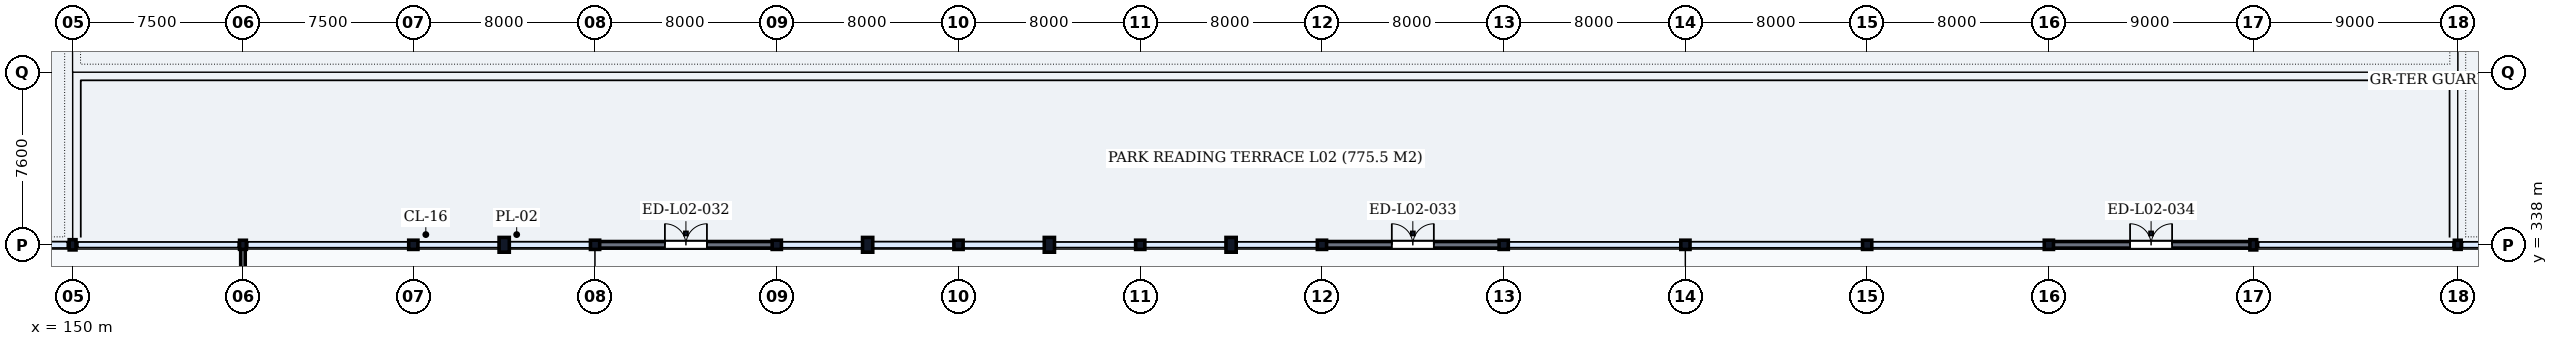
"""IFC4 building model, lengths in metres.
Left out: names, types, materials, properties, quantities, classifications, styles, units other than length and angle.
Written with IfcOpenShell. Run it as: python <this file> out.ifc"""

import sys

from ifc_helpers import new_model, si_unit, direction, frame, frame_2d, origin, origin_2d, place, context, subcontext, project, spatial, rectangle, hollow_circle, i_section, extrude, element, fill, save


model = new_model("IFC4")
c1 = context("Model", 3, precision=1e-05, world=origin(), true_north=direction((0.0, 1.0)))
c2 = subcontext(c1, "Body", "Model", "MODEL_VIEW")
j1 = project(units=[si_unit("LENGTHUNIT", "METRE"), si_unit("PLANEANGLEUNIT", "RADIAN")], contexts=[c1])
p1 = place(None, origin())
s1 = spatial("IfcSite", under=j1, at=p1, CompositionType="ELEMENT")
p2 = place(p1, origin())
s2 = spatial("IfcBuilding", under=s1, at=p2, CompositionType="ELEMENT")
p3 = place(p2, frame((0.0, 0.0, 5.4)))
s3 = spatial("IfcBuildingStorey", under=s2, at=p3, CompositionType="ELEMENT", Elevation=5.4)
p4 = place(p3, frame((150.0, 338.0, 0.0), z_axis=(0.0, 0.0, 1.0), x_axis=(1.0, 0.0, 0.0)))
e1 = element("IfcColumn", 1, at=p4, inside=s3, PredefinedType="COLUMN", context=c2, shape_type="SweptSolid", body=[
    extrude(i_section(OverallWidth=0.3, OverallDepth=0.45, WebThickness=0.014, FlangeThickness=0.026, FilletRadius=0.027, at=origin_2d()), origin(), (0.0, 0.0, 1.0), 5.1),
])
p5 = place(p3, frame((157.5, 338.0, 0.0), z_axis=(0.0, 0.0, 1.0), x_axis=(1.0, 0.0, 0.0)))
e2 = element("IfcColumn", 2, at=p5, inside=s3, PredefinedType="COLUMN", context=c2, shape_type="SweptSolid", body=[
    extrude(i_section(OverallWidth=0.3, OverallDepth=0.4, WebThickness=0.013, FlangeThickness=0.024, FilletRadius=0.027, at=origin_2d()), origin(), (0.0, 0.0, 1.0), 5.1),
])
for number, where, z_axis, x_axis in (
    (3, (165.0, 338.0, 0.0), (0.0, 0.0, 1.0), (1.0, 0.0, 0.0)),
    (4, (173.0, 338.0, 0.0), (0.0, 0.0, 1.0), (1.0, 0.0, 0.0)),
    (5, (181.0, 338.0, 0.0), (0.0, 0.0, 1.0), (1.0, 0.0, 0.0)),
    (6, (189.0, 338.0, 0.0), (0.0, 0.0, 1.0), (1.0, 0.0, 0.0)),
    (7, (197.0, 338.0, 0.0), (0.0, 0.0, 1.0), (1.0, 0.0, 0.0)),
    (8, (205.0, 338.0, 0.0), (0.0, 0.0, 1.0), (1.0, 0.0, 0.0)),
    (9, (213.0, 338.0, 0.0), (0.0, 0.0, 1.0), (1.0, 0.0, 0.0)),
    (10, (221.0, 338.0, 0.0), (0.0, 0.0, 1.0), (1.0, 0.0, 0.0)),
    (11, (229.0, 338.0, 0.0), (0.0, 0.0, 1.0), (1.0, 0.0, 0.0)),
    (12, (237.0, 338.0, 0.0), (0.0, 0.0, 1.0), (1.0, 0.0, 0.0)),
):
    element("IfcColumn", number, at=place(p3, frame(where, z_axis=z_axis, x_axis=x_axis)), inside=s3, PredefinedType="COLUMN", context=c2, shape_type="SweptSolid", body=[
        extrude(hollow_circle(Radius=0.203, WallThickness=0.016, at=origin_2d()), origin(), (0.0, 0.0, 1.0), 5.1),
    ])
p6 = place(p3, frame((246.0, 338.0, 0.0), z_axis=(0.0, 0.0, 1.0), x_axis=(1.0, 0.0, 0.0)))
e13 = element("IfcColumn", 13, at=p6, inside=s3, PredefinedType="COLUMN", context=c2, shape_type="SweptSolid", body=[
    extrude(i_section(OverallWidth=0.3, OverallDepth=0.45, WebThickness=0.014, FlangeThickness=0.026, FilletRadius=0.027, at=origin_2d()), origin(), (0.0, 0.0, 1.0), 5.1),
])
p7 = place(p3, frame((255.0, 338.0, 0.0), z_axis=(0.0, 0.0, 1.0), x_axis=(1.0, 0.0, 0.0)))
e14 = element("IfcColumn", 14, at=p7, inside=s3, PredefinedType="COLUMN", context=c2, shape_type="SweptSolid", body=[
    extrude(i_section(OverallWidth=0.3, OverallDepth=0.4, WebThickness=0.013, FlangeThickness=0.024, FilletRadius=0.027, at=origin_2d()), origin(), (0.0, 0.0, 1.0), 5.1),
])
for number, where, z_axis, x_axis in (
    (15, (169.0, 338.0, 0.0), (0.0, 0.0, 1.0), (1.0, 0.0, 0.0)),
    (16, (185.0, 338.0, 0.0), (0.0, 0.0, 1.0), (1.0, 0.0, 0.0)),
    (17, (193.0, 338.0, 0.0), (0.0, 0.0, 1.0), (1.0, 0.0, 0.0)),
    (18, (201.0, 338.0, 0.0), (0.0, 0.0, 1.0), (1.0, 0.0, 0.0)),
):
    element("IfcColumn", number, at=place(p3, frame(where, z_axis=z_axis, x_axis=x_axis)), inside=s3, PredefinedType="PILASTER", context=c2, shape_type="SweptSolid", body=[
        extrude(rectangle(XDim=0.45, YDim=0.65, at=origin_2d()), origin(), (0.0, 0.0, 1.0), 5.1),
    ])
p8 = place(p3, frame((173.006, 338.0, 0.0), z_axis=(0.0, 0.0, 1.0), x_axis=(1.0, 0.0, 0.0)))
e19 = element("IfcWall", 19, at=p8, inside=s3, PredefinedType="SOLIDWALL", context=c2, shape_type="SweptSolid", body=[
    extrude(rectangle(XDim=7.988, YDim=0.29, at=frame_2d((3.994, 0.0))), origin(), (0.0, 0.0, 1.0), 4.538),
])
p9 = place(p8, frame((3.069, 0.0, 0.0)))
e20 = element("IfcOpeningElement", 20, at=p9, cuts=e19, PredefinedType="OPENING", context=c2, shape_type="SweptSolid", body=[
    extrude(rectangle(XDim=1.85, YDim=2.35, at=frame_2d((0.925, 1.175))), frame((0.0, 0.16, 0.0), z_axis=(0.0, -1.0, 0.0), x_axis=(1.0, 0.0, 0.0)), (0.0, 0.0, 1.0), 0.32),
])
p10 = place(p3, frame((205.006, 338.0, 0.0), z_axis=(0.0, 0.0, 1.0), x_axis=(1.0, 0.0, 0.0)))
e21 = element("IfcWall", 21, at=p10, inside=s3, PredefinedType="SOLIDWALL", context=c2, shape_type="SweptSolid", body=[
    extrude(rectangle(XDim=7.988, YDim=0.29, at=frame_2d((3.994, 0.0))), origin(), (0.0, 0.0, 1.0), 4.538),
])
p11 = place(p10, frame((3.069, 0.0, 0.0)))
e22 = element("IfcOpeningElement", 22, at=p11, cuts=e21, PredefinedType="OPENING", context=c2, shape_type="SweptSolid", body=[
    extrude(rectangle(XDim=1.85, YDim=2.35, at=frame_2d((0.925, 1.175))), frame((0.0, 0.16, 0.0), z_axis=(0.0, -1.0, 0.0), x_axis=(1.0, 0.0, 0.0)), (0.0, 0.0, 1.0), 0.32),
])
p12 = place(p3, frame((237.006, 338.0, 0.0), z_axis=(0.0, 0.0, 1.0), x_axis=(1.0, 0.0, 0.0)))
e23 = element("IfcWall", 23, at=p12, inside=s3, PredefinedType="SOLIDWALL", context=c2, shape_type="SweptSolid", body=[
    extrude(rectangle(XDim=8.988, YDim=0.29, at=frame_2d((4.494, 0.0))), origin(), (0.0, 0.0, 1.0), 4.498),
])
p13 = place(p12, frame((3.569, 0.0, 0.0)))
e24 = element("IfcOpeningElement", 24, at=p13, cuts=e23, PredefinedType="OPENING", context=c2, shape_type="SweptSolid", body=[
    extrude(rectangle(XDim=1.85, YDim=2.35, at=frame_2d((0.925, 1.175))), frame((0.0, 0.16, 0.0), z_axis=(0.0, -1.0, 0.0), x_axis=(1.0, 0.0, 0.0)), (0.0, 0.0, 1.0), 0.32),
])
p14 = place(p3, frame((135.1, 337.9, 5.1), z_axis=(0.0, 0.0, 1.0), x_axis=(1.0, 0.0, 0.0)))
e25 = element("IfcWall", 25, at=p14, inside=s3, PredefinedType="PARAPET", context=c2, shape_type="SweptSolid", body=[
    extrude(rectangle(XDim=14.8, YDim=0.18, at=frame_2d((7.4, 0.0))), origin(), (0.0, 0.0, 1.0), 1.2),
])
p15 = place(p3, frame((150.1, 337.9, 5.1), z_axis=(0.0, 0.0, 1.0), x_axis=(1.0, 0.0, 0.0)))
e26 = element("IfcWall", 26, at=p15, inside=s3, PredefinedType="PARAPET", context=c2, shape_type="SweptSolid", body=[
    extrude(rectangle(XDim=7.3, YDim=0.18, at=frame_2d((3.65, 0.0))), origin(), (0.0, 0.0, 1.0), 1.2),
])
p16 = place(p3, frame((255.1, 337.9, 5.1), z_axis=(0.0, 0.0, 1.0), x_axis=(1.0, 0.0, 0.0)))
e27 = element("IfcWall", 27, at=p16, inside=s3, PredefinedType="PARAPET", context=c2, shape_type="SweptSolid", body=[
    extrude(rectangle(XDim=17.8, YDim=0.18, at=frame_2d((8.9, 0.0))), origin(), (0.0, 0.0, 1.0), 1.2),
])
p17 = place(p3, frame((157.6, 337.9, 5.1), z_axis=(0.0, 0.0, 1.0), x_axis=(1.0, 0.0, 0.0)))
e28 = element("IfcWall", 28, at=p17, inside=s3, PredefinedType="PARAPET", context=c2, shape_type="SweptSolid", body=[
    extrude(rectangle(XDim=97.3, YDim=0.18, at=frame_2d((48.65, 0.0))), origin(), (0.0, 0.0, 1.0), 1.2),
])
p18 = place(p3, frame((157.5, 308.4, 0.0), z_axis=(0.0, 0.0, 1.0), x_axis=(0.0, 1.0, 0.0)))
e29 = element("IfcWall", 29, at=p18, inside=s3, PredefinedType="PARTITIONING", context=c2, shape_type="SweptSolid", body=[
    extrude(rectangle(XDim=29.6, YDim=0.2, at=frame_2d((14.8, 0.0))), origin(), (0.0, 0.0, 1.0), 4.498),
])
p19 = place(p18, frame((3.45, 0.0, 0.0)))
e30 = element("IfcOpeningElement", 30, at=p19, cuts=e29, PredefinedType="OPENING", context=c2, shape_type="SweptSolid", body=[
    extrude(rectangle(XDim=1.1, YDim=2.1, at=frame_2d((0.55, 1.05))), frame((0.0, 0.115, 0.0), z_axis=(0.0, -1.0, 0.0), x_axis=(1.0, 0.0, 0.0)), (0.0, 0.0, 1.0), 0.23),
])
p20 = place(p18, frame((17.25, 0.0, 0.0)))
e31 = element("IfcOpeningElement", 31, at=p20, cuts=e29, PredefinedType="OPENING", context=c2, shape_type="SweptSolid", body=[
    extrude(rectangle(XDim=1.5, YDim=2.25, at=frame_2d((0.75, 1.125))), frame((0.0, 0.115, 0.0), z_axis=(0.0, -1.0, 0.0), x_axis=(1.0, 0.0, 0.0)), (0.0, 0.0, 1.0), 0.23),
])
p21 = place(p9, origin())
e32 = element("IfcDoor", 32, at=p21, inside=s3, OperationType="DOUBLE_DOOR_SINGLE_SWING", PredefinedType="DOOR", context=c2, shape_type="SweptSolid", body=[
    extrude(rectangle(XDim=1.85, YDim=2.35, at=frame_2d((0.925, 1.175))), frame((0.0, 0.025, 0.0), z_axis=(0.0, -1.0, 0.0), x_axis=(1.0, 0.0, 0.0)), (0.0, 0.0, 1.0), 0.05),
])
fill(e20, e32)
p22 = place(p11, origin())
e33 = element("IfcDoor", 33, at=p22, inside=s3, OperationType="DOUBLE_DOOR_SINGLE_SWING", PredefinedType="DOOR", context=c2, shape_type="SweptSolid", body=[
    extrude(rectangle(XDim=1.85, YDim=2.35, at=frame_2d((0.925, 1.175))), frame((0.0, 0.025, 0.0), z_axis=(0.0, -1.0, 0.0), x_axis=(1.0, 0.0, 0.0)), (0.0, 0.0, 1.0), 0.05),
])
fill(e22, e33)
p23 = place(p13, origin())
e34 = element("IfcDoor", 34, at=p23, inside=s3, OperationType="DOUBLE_DOOR_SINGLE_SWING", PredefinedType="DOOR", context=c2, shape_type="SweptSolid", body=[
    extrude(rectangle(XDim=1.85, YDim=2.35, at=frame_2d((0.925, 1.175))), frame((0.0, 0.025, 0.0), z_axis=(0.0, -1.0, 0.0), x_axis=(1.0, 0.0, 0.0)), (0.0, 0.0, 1.0), 0.05),
])
fill(e24, e34)
save(model, sys.argv[1])
